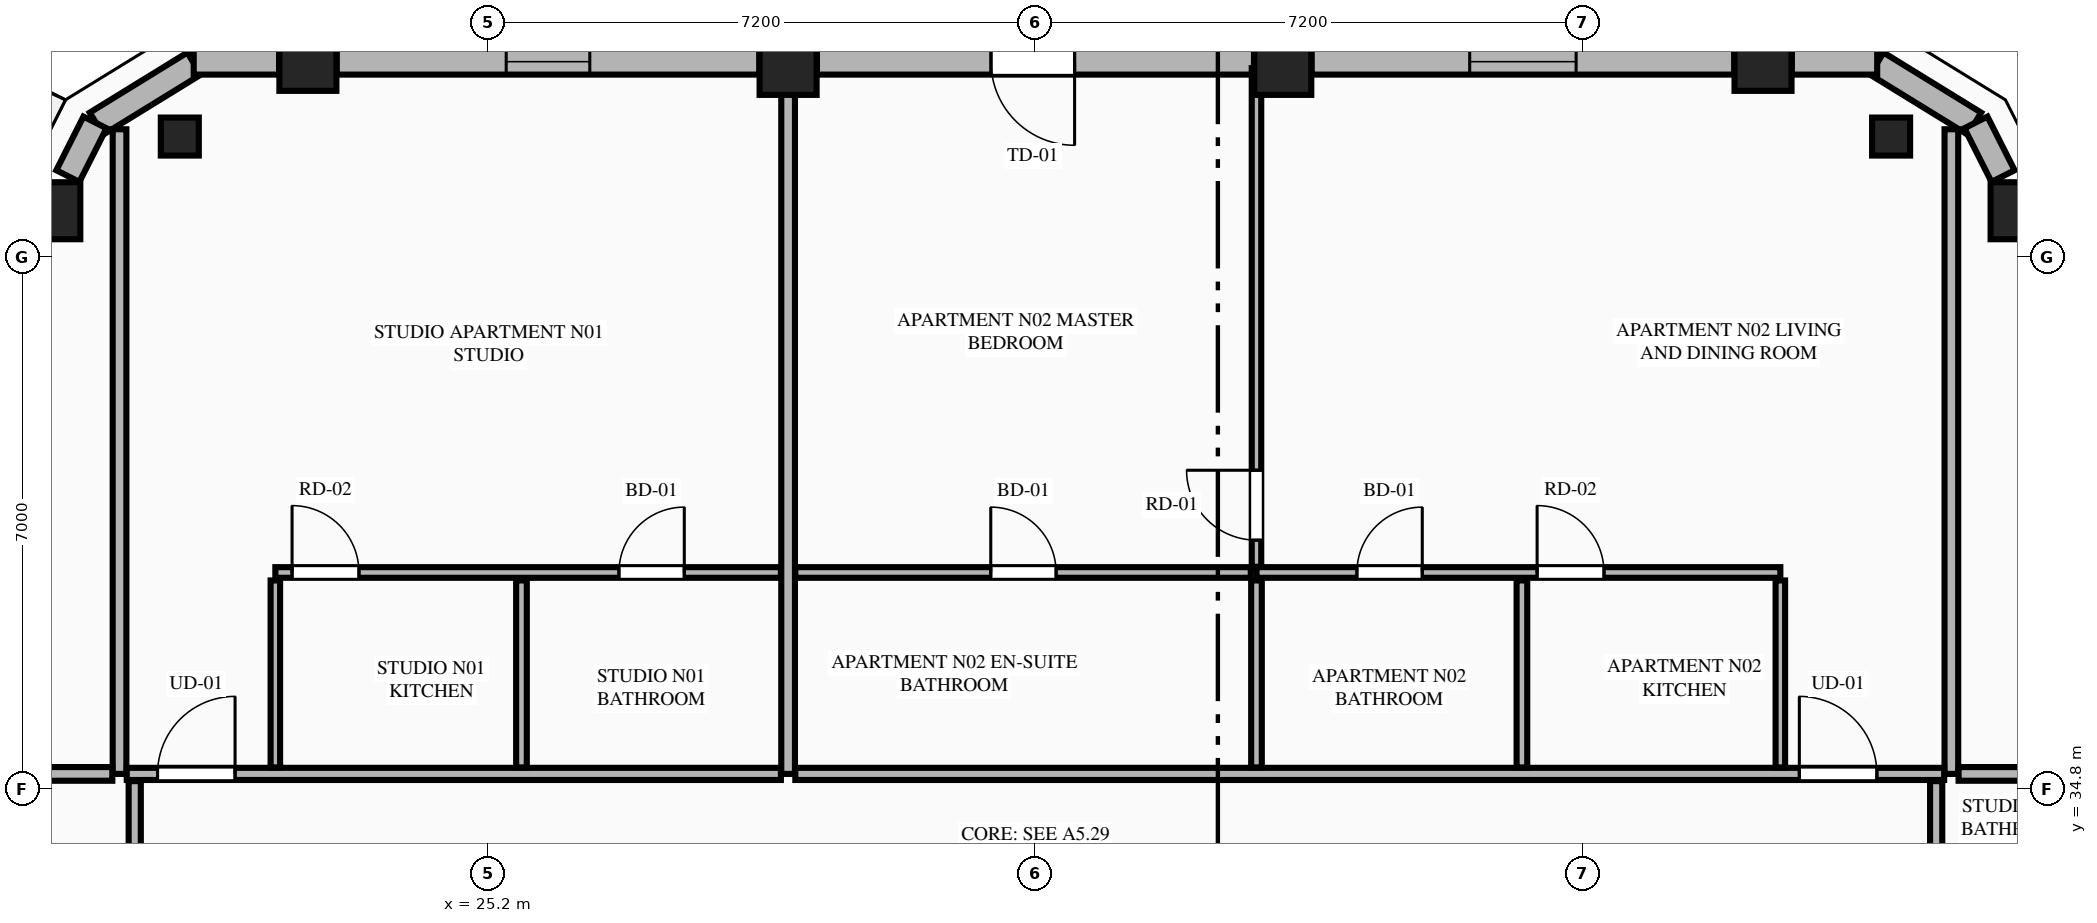
"""IFC4 building model, lengths in metres.
Left out: names, types, materials, properties, quantities, classifications, styles, units other than length and angle.
Written with IfcOpenShell. Run it as: python <this file> out.ifc"""

import sys

from ifc_helpers import new_model, si_unit, direction, frame, frame_2d, origin, origin_2d, place, context, subcontext, project, spatial, rectangle, extrude, element, fill, save


model = new_model("IFC4")
c1 = context("Model", 3, precision=1e-05, world=origin(), true_north=direction((0.0, 1.0)))
c2 = subcontext(c1, "Body", "Model", "MODEL_VIEW")
j1 = project(units=[si_unit("LENGTHUNIT", "METRE"), si_unit("PLANEANGLEUNIT", "RADIAN")], contexts=[c1])
p1 = place(None, origin())
s1 = spatial("IfcSite", under=j1, at=p1, CompositionType="ELEMENT")
p2 = place(p1, origin())
s2 = spatial("IfcBuilding", under=s1, at=p2, CompositionType="ELEMENT")
p3 = place(p2, frame((0.0, 0.0, 252.55)))
s3 = spatial("IfcBuildingStorey", under=s2, at=p3, CompositionType="ELEMENT", Elevation=252.55)
for number, where, z_axis, x_axis in (
    (1, (45.341, 42.409, 0.0), (0.0, 0.0, 1.0), (1.0, 0.0, 0.0)),
    (2, (41.972, 44.361, 0.0), (0.0, 0.0, 1.0), (1.0, 0.0, 0.0)),
    (3, (35.654, 44.308, 0.0), (0.0, 0.0, 1.0), (1.0, 0.0, 0.0)),
    (4, (29.146, 44.308, 0.0), (0.0, 0.0, 1.0), (1.0, 0.0, 0.0)),
    (5, (22.828, 44.361, 0.0), (0.0, 0.0, 1.0), (1.0, 0.0, 0.0)),
    (6, (19.459, 42.409, 0.0), (0.0, 0.0, 1.0), (1.0, 0.0, 0.0)),
):
    element("IfcColumn", number, at=place(p3, frame(where, z_axis=z_axis, x_axis=x_axis)), inside=s3, PredefinedType="COLUMN", context=c2, shape_type="SweptSolid", body=[
        extrude(rectangle(XDim=0.75, YDim=0.75, at=origin_2d()), origin(), (0.0, 0.0, 1.0), 3.65),
    ])
for number, where, z_axis, x_axis in (
    (7, (43.657, 43.385, 0.0), (0.0, 0.0, 1.0), (-0.865, 0.501, 0.0)),
    (8, (21.143, 43.385, 0.0), (0.0, 0.0, 1.0), (-0.865, -0.501, 0.0)),
):
    element("IfcColumn", number, at=place(p3, frame(where, z_axis=z_axis, x_axis=x_axis)), inside=s3, PredefinedType="PILASTER", context=c2, shape_type="SweptSolid", body=[
        extrude(rectangle(XDim=0.5, YDim=0.35, at=origin_2d()), origin(), (0.0, 0.0, 1.0), 3.65),
    ])
for number, where, z_axis, x_axis in (
    (9, (44.753, 43.555, 0.0), (0.0, 0.0, 1.0), (-0.852, 0.524, 0.0)),
    (10, (21.331, 44.345, 0.0), (0.0, 0.0, 1.0), (-0.852, -0.524, 0.0)),
):
    element("IfcWall", number, at=place(p3, frame(where, z_axis=z_axis, x_axis=x_axis)), inside=s3, PredefinedType="STANDARD", context=c2, shape_type="SweptSolid", body=[
        extrude(rectangle(XDim=1.508, YDim=0.34, at=frame_2d((0.754, 0.0))), origin(), (0.0, 0.0, 1.0), 3.45),
    ])
p4 = place(p3, frame((45.13, 42.865, 0.0), z_axis=(0.0, 0.0, 1.0), x_axis=(-0.451159191899, 0.892443490404, 0.0)))
e11 = element("IfcWall", 11, at=p4, inside=s3, PredefinedType="STANDARD", context=c2, shape_type="SweptSolid", body=[
    extrude(rectangle(XDim=0.791, YDim=0.34, at=frame_2d((0.396, 0.0))), origin(), (0.0, 0.0, 1.0), 3.45),
])
p5 = place(p3, frame((43.474, 44.37, 0.0), z_axis=(0.0, 0.0, 1.0), x_axis=(-1.0, 0.0, 0.0)))
e12 = element("IfcWall", 12, at=p5, inside=s3, PredefinedType="STANDARD", context=c2, shape_type="SweptSolid", body=[
    extrude(rectangle(XDim=1.123, YDim=0.34, at=frame_2d((0.562, 0.0))), origin(), (0.0, 0.0, 1.0), 3.45),
])
p6 = place(p3, frame((41.593, 44.37, 0.0), z_axis=(0.0, 0.0, 1.0), x_axis=(-1.0, 0.0, 0.0)))
e13 = element("IfcWall", 13, at=p6, inside=s3, PredefinedType="STANDARD", context=c2, shape_type="SweptSolid", body=[
    extrude(rectangle(XDim=5.56, YDim=0.34, at=frame_2d((2.78, 0.0))), origin(), (0.0, 0.0, 1.0), 2.983),
])
p7 = place(p6, frame((2.08, 0.0, 0.75)))
e14 = element("IfcOpeningElement", 14, at=p7, cuts=e13, PredefinedType="OPENING", context=c2, shape_type="SweptSolid", body=[
    extrude(rectangle(XDim=1.4, YDim=2.05, at=frame_2d((0.7, 1.025))), frame((0.0, 0.18, 0.0), z_axis=(0.0, -1.0, 0.0), x_axis=(1.0, 0.0, 0.0)), (0.0, 0.0, 1.0), 0.36),
])
p8 = place(p3, frame((35.275, 44.37, 0.0), z_axis=(0.0, 0.0, 1.0), x_axis=(-1.0, 0.0, 0.0)))
e15 = element("IfcWall", 15, at=p8, inside=s3, PredefinedType="STANDARD", context=c2, shape_type="SweptSolid", body=[
    extrude(rectangle(XDim=5.75, YDim=0.34, at=frame_2d((2.875, 0.0))), origin(), (0.0, 0.0, 1.0), 2.983),
])
p9 = place(p8, frame((2.36, 0.0, 0.0)))
e16 = element("IfcOpeningElement", 16, at=p9, cuts=e15, PredefinedType="OPENING", context=c2, shape_type="SweptSolid", body=[
    extrude(rectangle(XDim=1.1, YDim=2.25, at=frame_2d((0.55, 1.125))), frame((0.0, 0.18, 0.0), z_axis=(0.0, -1.0, 0.0), x_axis=(1.0, 0.0, 0.0)), (0.0, 0.0, 1.0), 0.36),
])
p10 = place(p3, frame((28.767, 44.37, 0.0), z_axis=(0.0, 0.0, 1.0), x_axis=(-1.0, 0.0, 0.0)))
e17 = element("IfcWall", 17, at=p10, inside=s3, PredefinedType="STANDARD", context=c2, shape_type="SweptSolid", body=[
    extrude(rectangle(XDim=5.56, YDim=0.34, at=frame_2d((2.78, 0.0))), origin(), (0.0, 0.0, 1.0), 2.983),
])
p11 = place(p10, frame((2.23, 0.0, 0.75)))
e18 = element("IfcOpeningElement", 18, at=p11, cuts=e17, PredefinedType="OPENING", context=c2, shape_type="SweptSolid", body=[
    extrude(rectangle(XDim=1.1, YDim=2.0, at=frame_2d((0.55, 1.0))), frame((0.0, 0.18, 0.0), z_axis=(0.0, -1.0, 0.0), x_axis=(1.0, 0.0, 0.0)), (0.0, 0.0, 1.0), 0.36),
])
p12 = place(p3, frame((22.449, 44.37, 0.0), z_axis=(0.0, 0.0, 1.0), x_axis=(-1.0, 0.0, 0.0)))
e19 = element("IfcWall", 19, at=p12, inside=s3, PredefinedType="STANDARD", context=c2, shape_type="SweptSolid", body=[
    extrude(rectangle(XDim=1.123, YDim=0.34, at=frame_2d((0.562, 0.0))), origin(), (0.0, 0.0, 1.0), 3.45),
])
p13 = place(p3, frame((20.027, 43.571, 0.0), z_axis=(0.0, 0.0, 1.0), x_axis=(-0.451404919072, -0.89231922485, 0.0)))
e20 = element("IfcWall", 20, at=p13, inside=s3, PredefinedType="STANDARD", context=c2, shape_type="SweptSolid", body=[
    extrude(rectangle(XDim=0.791, YDim=0.34, at=frame_2d((0.396, 0.0))), origin(), (0.0, 0.0, 1.0), 3.45),
])
p14 = place(p3, frame((20.35, 35.0, 0.0), z_axis=(0.0, 0.0, 1.0), x_axis=(0.0, 1.0, 0.0)))
e21 = element("IfcWall", 21, at=p14, inside=s3, PredefinedType="PARTITIONING", context=c2, shape_type="SweptSolid", body=[
    extrude(rectangle(XDim=8.481, YDim=0.18, at=frame_2d((4.24, 0.0))), origin(), (0.0, 0.0, 1.0), 3.45),
])
p15 = place(p3, frame((29.146, 35.0, 0.0), z_axis=(0.0, 0.0, 1.0), x_axis=(0.0, 1.0, 0.0)))
e22 = element("IfcWall", 22, at=p15, inside=s3, PredefinedType="PARTITIONING", context=c2, shape_type="SweptSolid", body=[
    extrude(rectangle(XDim=9.195, YDim=0.18, at=frame_2d((4.598, 0.0))), origin(), (0.0, 0.0, 1.0), 2.907),
])
p16 = place(p3, frame((44.45, 35.0, 0.0), z_axis=(0.0, 0.0, 1.0), x_axis=(0.0, 1.0, 0.0)))
e23 = element("IfcWall", 23, at=p16, inside=s3, PredefinedType="PARTITIONING", context=c2, shape_type="SweptSolid", body=[
    extrude(rectangle(XDim=8.481, YDim=0.18, at=frame_2d((4.24, 0.0))), origin(), (0.0, 0.0, 1.0), 3.45),
])
p17 = place(p3, frame((20.445, 35.0, 0.0), z_axis=(0.0, 0.0, 1.0), x_axis=(1.0, 0.0, 0.0)))
e24 = element("IfcWall", 24, at=p17, inside=s3, PredefinedType="PARTITIONING", context=c2, shape_type="SweptSolid", body=[
    extrude(rectangle(XDim=8.606, YDim=0.16, at=frame_2d((4.303, 0.0))), origin(), (0.0, 0.0, 1.0), 3.45),
])
p18 = place(p17, frame((0.405, 0.0, 0.0)))
e25 = element("IfcOpeningElement", 25, at=p18, cuts=e24, PredefinedType="OPENING", context=c2, shape_type="SweptSolid", body=[
    extrude(rectangle(XDim=1.02, YDim=2.25, at=frame_2d((0.51, 1.125))), frame((0.0, 0.09, 0.0), z_axis=(0.0, -1.0, 0.0), x_axis=(1.0, 0.0, 0.0)), (0.0, 0.0, 1.0), 0.18),
])
p19 = place(p3, frame((22.4, 35.085, 0.0), z_axis=(0.0, 0.0, 1.0), x_axis=(0.0, 1.0, 0.0)))
e26 = element("IfcWall", 26, at=p19, inside=s3, PredefinedType="PARTITIONING", context=c2, shape_type="SweptSolid", body=[
    extrude(rectangle(XDim=2.46, YDim=0.125, at=frame_2d((1.23, 0.0))), origin(), (0.0, 0.0, 1.0), 3.45),
])
p20 = place(p3, frame((22.4, 37.65, 0.0), z_axis=(0.0, 0.0, 1.0), x_axis=(1.0, 0.0, 0.0)))
e27 = element("IfcWall", 27, at=p20, inside=s3, PredefinedType="PLUMBINGWALL", context=c2, shape_type="SweptSolid", body=[
    extrude(rectangle(XDim=6.651, YDim=0.14, at=frame_2d((3.326, 0.0))), origin(), (0.0, 0.0, 1.0), 3.45),
])
p21 = place(p20, frame((4.52, 0.0, 0.0)))
e28 = element("IfcOpeningElement", 28, at=p21, cuts=e27, PredefinedType="OPENING", context=c2, shape_type="SweptSolid", body=[
    extrude(rectangle(XDim=0.86, YDim=2.1, at=frame_2d((0.43, 1.05))), frame((0.0, 0.08, 0.0), z_axis=(0.0, -1.0, 0.0), x_axis=(1.0, 0.0, 0.0)), (0.0, 0.0, 1.0), 0.16),
])
p22 = place(p20, frame((0.22, 0.0, 0.0)))
e29 = element("IfcOpeningElement", 29, at=p22, cuts=e27, PredefinedType="OPENING", context=c2, shape_type="SweptSolid", body=[
    extrude(rectangle(XDim=0.88, YDim=2.15, at=frame_2d((0.44, 1.075))), frame((0.0, 0.08, 0.0), z_axis=(0.0, -1.0, 0.0), x_axis=(1.0, 0.0, 0.0)), (0.0, 0.0, 1.0), 0.16),
])
p23 = place(p3, frame((25.638, 35.085, 0.0), z_axis=(0.0, 0.0, 1.0), x_axis=(0.0, 1.0, 0.0)))
e30 = element("IfcWall", 30, at=p23, inside=s3, PredefinedType="PLUMBINGWALL", context=c2, shape_type="SweptSolid", body=[
    extrude(rectangle(XDim=2.46, YDim=0.14, at=frame_2d((1.23, 0.0))), origin(), (0.0, 0.0, 1.0), 3.45),
])
p24 = place(p3, frame((29.241, 35.0, 0.0), z_axis=(0.0, 0.0, 1.0), x_axis=(1.0, 0.0, 0.0)))
e31 = element("IfcWall", 31, at=p24, inside=s3, PredefinedType="PARTITIONING", context=c2, shape_type="SweptSolid", body=[
    extrude(rectangle(XDim=15.114, YDim=0.16, at=frame_2d((7.557, 0.0))), origin(), (0.0, 0.0, 1.0), 3.45),
])
p25 = place(p24, frame((13.209, 0.0, 0.0)))
e32 = element("IfcOpeningElement", 32, at=p25, cuts=e31, PredefinedType="OPENING", context=c2, shape_type="SweptSolid", body=[
    extrude(rectangle(XDim=1.02, YDim=2.25, at=frame_2d((0.51, 1.125))), frame((0.0, 0.09, 0.0), z_axis=(0.0, -1.0, 0.0), x_axis=(1.0, 0.0, 0.0)), (0.0, 0.0, 1.0), 0.18),
])
p26 = place(p3, frame((42.2, 35.085, 0.0), z_axis=(0.0, 0.0, 1.0), x_axis=(0.0, 1.0, 0.0)))
e33 = element("IfcWall", 33, at=p26, inside=s3, PredefinedType="PARTITIONING", context=c2, shape_type="SweptSolid", body=[
    extrude(rectangle(XDim=2.46, YDim=0.125, at=frame_2d((1.23, 0.0))), origin(), (0.0, 0.0, 1.0), 3.45),
])
p27 = place(p3, frame((35.308, 37.65, 0.0), z_axis=(0.0, 0.0, 1.0), x_axis=(1.0, 0.0, 0.0)))
e34 = element("IfcWall", 34, at=p27, inside=s3, PredefinedType="PLUMBINGWALL", context=c2, shape_type="SweptSolid", body=[
    extrude(rectangle(XDim=6.892, YDim=0.14, at=frame_2d((3.446, 0.0))), origin(), (0.0, 0.0, 1.0), 3.45),
])
p28 = place(p27, frame((1.321, 0.0, 0.0)))
e35 = element("IfcOpeningElement", 35, at=p28, cuts=e34, PredefinedType="OPENING", context=c2, shape_type="SweptSolid", body=[
    extrude(rectangle(XDim=0.86, YDim=2.1, at=frame_2d((0.43, 1.05))), frame((0.0, 0.08, 0.0), z_axis=(0.0, -1.0, 0.0), x_axis=(1.0, 0.0, 0.0)), (0.0, 0.0, 1.0), 0.16),
])
p29 = place(p27, frame((3.692, 0.0, 0.0)))
e36 = element("IfcOpeningElement", 36, at=p29, cuts=e34, PredefinedType="OPENING", context=c2, shape_type="SweptSolid", body=[
    extrude(rectangle(XDim=0.88, YDim=2.15, at=frame_2d((0.44, 1.075))), frame((0.0, 0.08, 0.0), z_axis=(0.0, -1.0, 0.0), x_axis=(1.0, 0.0, 0.0)), (0.0, 0.0, 1.0), 0.16),
])
p30 = place(p3, frame((29.241, 37.65, 0.0), z_axis=(0.0, 0.0, 1.0), x_axis=(1.0, 0.0, 0.0)))
e37 = element("IfcWall", 37, at=p30, inside=s3, PredefinedType="PLUMBINGWALL", context=c2, shape_type="SweptSolid", body=[
    extrude(rectangle(XDim=5.992, YDim=0.14, at=frame_2d((2.996, 0.0))), origin(), (0.0, 0.0, 1.0), 3.45),
])
p31 = place(p30, frame((2.571, 0.0, 0.0)))
e38 = element("IfcOpeningElement", 38, at=p31, cuts=e37, PredefinedType="OPENING", context=c2, shape_type="SweptSolid", body=[
    extrude(rectangle(XDim=0.86, YDim=2.1, at=frame_2d((0.43, 1.05))), frame((0.0, 0.08, 0.0), z_axis=(0.0, -1.0, 0.0), x_axis=(1.0, 0.0, 0.0)), (0.0, 0.0, 1.0), 0.16),
])
for number, where, z_axis, x_axis in (
    (39, (38.8, 35.085, 0.0), (0.0, 0.0, 1.0), (0.0, 1.0, 0.0)),
    (40, (35.308, 35.085, 0.0), (0.0, 0.0, 1.0), (0.0, 1.0, 0.0)),
):
    element("IfcWall", number, at=place(p3, frame(where, z_axis=z_axis, x_axis=x_axis)), inside=s3, PredefinedType="PLUMBINGWALL", context=c2, shape_type="SweptSolid", body=[
        extrude(rectangle(XDim=2.46, YDim=0.14, at=frame_2d((1.23, 0.0))), origin(), (0.0, 0.0, 1.0), 3.45),
    ])
p32 = place(p3, frame((35.308, 37.725, 0.0), z_axis=(0.0, 0.0, 1.0), x_axis=(0.0, 1.0, 0.0)))
e41 = element("IfcWall", 41, at=p32, inside=s3, PredefinedType="PARTITIONING", context=c2, shape_type="SweptSolid", body=[
    extrude(rectangle(XDim=6.56, YDim=0.125, at=frame_2d((3.28, 0.0))), origin(), (0.0, 0.0, 1.0), 3.45),
])
p33 = place(p32, frame((0.35, 0.0, 0.0)))
e42 = element("IfcOpeningElement", 42, at=p33, cuts=e41, PredefinedType="OPENING", context=c2, shape_type="SweptSolid", body=[
    extrude(rectangle(XDim=0.92, YDim=2.15, at=frame_2d((0.46, 1.075))), frame((0.0, 0.073, 0.0), z_axis=(0.0, -1.0, 0.0), x_axis=(1.0, 0.0, 0.0)), (0.0, 0.0, 1.0), 0.145),
])
p34 = place(p3, frame((15.933, 35.0, 0.0), z_axis=(0.0, 0.0, 1.0), x_axis=(1.0, 0.0, 0.0)))
e43 = element("IfcWall", 43, at=p34, inside=s3, PredefinedType="PARTITIONING", context=c2, shape_type="SweptSolid", body=[
    extrude(rectangle(XDim=4.322, YDim=0.18, at=frame_2d((2.161, 0.0))), origin(), (0.0, 0.0, 1.0), 3.45),
])
p35 = place(p3, frame((44.545, 35.0, 0.0), z_axis=(0.0, 0.0, 1.0), x_axis=(1.0, 0.0, 0.0)))
e44 = element("IfcWall", 44, at=p35, inside=s3, PredefinedType="PARTITIONING", context=c2, shape_type="SweptSolid", body=[
    extrude(rectangle(XDim=4.322, YDim=0.18, at=frame_2d((2.161, 0.0))), origin(), (0.0, 0.0, 1.0), 3.45),
])
p36 = place(p3, frame((20.55, 16.495, 0.0), z_axis=(0.0, 0.0, 1.0), x_axis=(0.0, 1.0, 0.0)))
e45 = element("IfcWall", 45, at=p36, inside=s3, PredefinedType="PARTITIONING", context=c2, shape_type="SweptSolid", body=[
    extrude(rectangle(XDim=18.41, YDim=0.16, at=frame_2d((9.205, 0.0))), origin(), (0.0, 0.0, 1.0), 3.137),
])
p37 = place(p36, frame((0.45, 0.0, 0.0)))
e46 = element("IfcOpeningElement", 46, at=p37, cuts=e45, PredefinedType="OPENING", context=c2, shape_type="SweptSolid", body=[
    extrude(rectangle(XDim=1.02, YDim=2.25, at=frame_2d((0.51, 1.125))), frame((0.0, 0.09, 0.0), z_axis=(0.0, -1.0, 0.0), x_axis=(1.0, 0.0, 0.0)), (0.0, 0.0, 1.0), 0.18),
])
p38 = place(p3, frame((44.25, 29.143, 0.0), z_axis=(0.0, 0.0, 1.0), x_axis=(0.0, 1.0, 0.0)))
e47 = element("IfcWall", 47, at=p38, inside=s3, PredefinedType="PARTITIONING", context=c2, shape_type="SweptSolid", body=[
    extrude(rectangle(XDim=5.762, YDim=0.16, at=frame_2d((2.881, 0.0))), origin(), (0.0, 0.0, 1.0), 3.137),
])
p39 = place(p38, frame((0.4, 0.0, 0.0)))
e48 = element("IfcOpeningElement", 48, at=p39, cuts=e47, PredefinedType="OPENING", context=c2, shape_type="SweptSolid", body=[
    extrude(rectangle(XDim=1.02, YDim=2.25, at=frame_2d((0.51, 1.125))), frame((0.0, 0.09, 0.0), z_axis=(0.0, -1.0, 0.0), x_axis=(1.0, 0.0, 0.0)), (0.0, 0.0, 1.0), 0.18),
])
p40 = place(p7, origin())
e49 = element("IfcWindow", 49, at=p40, inside=s3, PartitioningType="SINGLE_PANEL", PredefinedType="WINDOW", context=c2, shape_type="SweptSolid", body=[
    extrude(rectangle(XDim=1.4, YDim=2.05, at=frame_2d((0.7, 1.025))), frame((0.0, 0.03, 0.0), z_axis=(0.0, -1.0, 0.0), x_axis=(1.0, 0.0, 0.0)), (0.0, 0.0, 1.0), 0.06),
])
fill(e14, e49)
p41 = place(p9, origin())
e50 = element("IfcDoor", 50, at=p41, inside=s3, OperationType="SINGLE_SWING_LEFT", PredefinedType="DOOR", context=c2, shape_type="SweptSolid", body=[
    extrude(rectangle(XDim=1.1, YDim=2.25, at=frame_2d((0.55, 1.125))), frame((0.0, 0.025, 0.0), z_axis=(0.0, -1.0, 0.0), x_axis=(1.0, 0.0, 0.0)), (0.0, 0.0, 1.0), 0.05),
])
fill(e16, e50)
p42 = place(p11, origin())
e51 = element("IfcWindow", 51, at=p42, inside=s3, PartitioningType="SINGLE_PANEL", PredefinedType="WINDOW", context=c2, shape_type="SweptSolid", body=[
    extrude(rectangle(XDim=1.1, YDim=2.0, at=frame_2d((0.55, 1.0))), frame((0.0, 0.03, 0.0), z_axis=(0.0, -1.0, 0.0), x_axis=(1.0, 0.0, 0.0)), (0.0, 0.0, 1.0), 0.06),
])
fill(e18, e51)
p43 = place(p21, origin())
e52 = element("IfcDoor", 52, at=p43, inside=s3, OperationType="SINGLE_SWING_RIGHT", PredefinedType="DOOR", context=c2, shape_type="SweptSolid", body=[
    extrude(rectangle(XDim=0.86, YDim=2.1, at=frame_2d((0.43, 1.05))), frame((0.0, 0.025, 0.0), z_axis=(0.0, -1.0, 0.0), x_axis=(1.0, 0.0, 0.0)), (0.0, 0.0, 1.0), 0.05),
])
fill(e28, e52)
p44 = place(p18, origin())
e53 = element("IfcDoor", 53, at=p44, inside=s3, OperationType="SINGLE_SWING_RIGHT", PredefinedType="DOOR", context=c2, shape_type="SweptSolid", body=[
    extrude(rectangle(XDim=1.02, YDim=2.25, at=frame_2d((0.51, 1.125))), frame((0.0, 0.025, 0.0), z_axis=(0.0, -1.0, 0.0), x_axis=(1.0, 0.0, 0.0)), (0.0, 0.0, 1.0), 0.05),
])
fill(e25, e53)
p45 = place(p22, origin())
e54 = element("IfcDoor", 54, at=p45, inside=s3, OperationType="SINGLE_SWING_LEFT", PredefinedType="DOOR", context=c2, shape_type="SweptSolid", body=[
    extrude(rectangle(XDim=0.88, YDim=2.15, at=frame_2d((0.44, 1.075))), frame((0.0, 0.025, 0.0), z_axis=(0.0, -1.0, 0.0), x_axis=(1.0, 0.0, 0.0)), (0.0, 0.0, 1.0), 0.05),
])
fill(e29, e54)
p46 = place(p28, origin())
e55 = element("IfcDoor", 55, at=p46, inside=s3, OperationType="SINGLE_SWING_RIGHT", PredefinedType="DOOR", context=c2, shape_type="SweptSolid", body=[
    extrude(rectangle(XDim=0.86, YDim=2.1, at=frame_2d((0.43, 1.05))), frame((0.0, 0.025, 0.0), z_axis=(0.0, -1.0, 0.0), x_axis=(1.0, 0.0, 0.0)), (0.0, 0.0, 1.0), 0.05),
])
fill(e35, e55)
p47 = place(p31, origin())
e56 = element("IfcDoor", 56, at=p47, inside=s3, OperationType="SINGLE_SWING_LEFT", PredefinedType="DOOR", context=c2, shape_type="SweptSolid", body=[
    extrude(rectangle(XDim=0.86, YDim=2.1, at=frame_2d((0.43, 1.05))), frame((0.0, 0.025, 0.0), z_axis=(0.0, -1.0, 0.0), x_axis=(1.0, 0.0, 0.0)), (0.0, 0.0, 1.0), 0.05),
])
fill(e38, e56)
p48 = place(p25, origin())
e57 = element("IfcDoor", 57, at=p48, inside=s3, OperationType="SINGLE_SWING_LEFT", PredefinedType="DOOR", context=c2, shape_type="SweptSolid", body=[
    extrude(rectangle(XDim=1.02, YDim=2.25, at=frame_2d((0.51, 1.125))), frame((0.0, 0.025, 0.0), z_axis=(0.0, -1.0, 0.0), x_axis=(1.0, 0.0, 0.0)), (0.0, 0.0, 1.0), 0.05),
])
fill(e32, e57)
p49 = place(p29, origin())
e58 = element("IfcDoor", 58, at=p49, inside=s3, OperationType="SINGLE_SWING_LEFT", PredefinedType="DOOR", context=c2, shape_type="SweptSolid", body=[
    extrude(rectangle(XDim=0.88, YDim=2.15, at=frame_2d((0.44, 1.075))), frame((0.0, 0.025, 0.0), z_axis=(0.0, -1.0, 0.0), x_axis=(1.0, 0.0, 0.0)), (0.0, 0.0, 1.0), 0.05),
])
fill(e36, e58)
p50 = place(p33, origin())
e59 = element("IfcDoor", 59, at=p50, inside=s3, OperationType="SINGLE_SWING_RIGHT", PredefinedType="DOOR", context=c2, shape_type="SweptSolid", body=[
    extrude(rectangle(XDim=0.92, YDim=2.15, at=frame_2d((0.46, 1.075))), frame((0.0, 0.025, 0.0), z_axis=(0.0, -1.0, 0.0), x_axis=(1.0, 0.0, 0.0)), (0.0, 0.0, 1.0), 0.05),
])
fill(e42, e59)
save(model, sys.argv[1])
